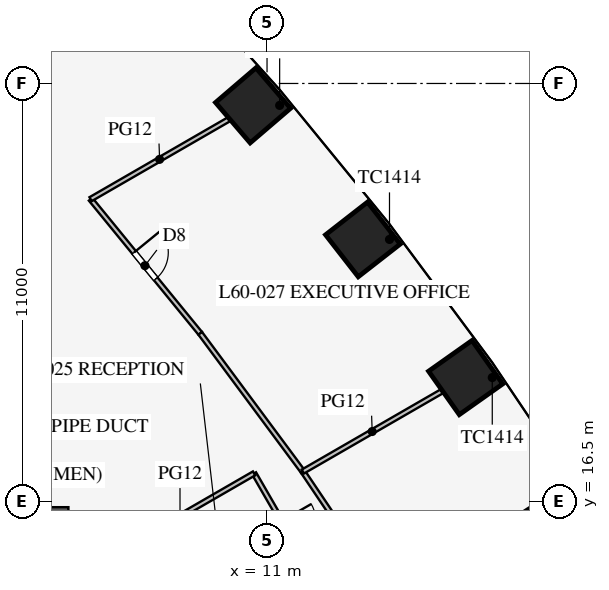
"""IFC4 building model, lengths in metres.
Left out: names, types, materials, properties, quantities, classifications, styles, units other than length and angle.
Written with IfcOpenShell. Run it as: python <this file> out.ifc"""

import sys

from ifc_helpers import new_model, si_unit, direction, frame, frame_2d, origin, origin_2d, place, context, subcontext, project, spatial, rectangle, extrude, element, fill, save


model = new_model("IFC4")
c1 = context("Model", 3, precision=1e-05, world=origin(), true_north=direction((0.0, 1.0)))
c2 = subcontext(c1, "Body", "Model", "MODEL_VIEW")
j1 = project(units=[si_unit("LENGTHUNIT", "METRE"), si_unit("PLANEANGLEUNIT", "RADIAN")], contexts=[c1])
p1 = place(None, origin())
s1 = spatial("IfcSite", under=j1, at=p1, CompositionType="ELEMENT")
p2 = place(p1, origin())
s2 = spatial("IfcBuilding", under=s1, at=p2, CompositionType="ELEMENT")
p3 = place(p2, frame((0.0, 0.0, 261.1)))
s3 = spatial("IfcBuildingStorey", under=s2, at=p3, CompositionType="ELEMENT", Elevation=261.1)
for number, where, z_axis, x_axis in (
    (1, (18.748, 16.02, 0.0), (0.0, 0.0, 1.0), (-0.539, 0.842, 0.0)),
    (2, (16.227, 19.761, 0.0), (0.0, 0.0, 1.0), (-0.577, 0.816, 0.0)),
    (3, (13.522, 23.396, 0.0), (0.0, 0.0, 1.0), (-0.615, 0.789, 0.0)),
    (4, (10.632, 26.923, 0.0), (0.0, 0.0, 1.0), (-0.651, 0.759, 0.0)),
):
    element("IfcColumn", number, at=place(p3, frame(where, z_axis=z_axis, x_axis=x_axis)), inside=s3, PredefinedType="COLUMN", context=c2, shape_type="SweptSolid", body=[
        extrude(rectangle(XDim=1.4, YDim=1.4, at=origin_2d()), origin(), (0.0, 0.0, 1.0), 4.2),
    ])
p4 = place(p3, frame((5.773, 16.0, 0.0), z_axis=(0.0, 0.0, 1.0), x_axis=(-1.0, 0.0, 0.0)))
e5 = element("IfcWall", 5, at=p4, inside=s3, PredefinedType="SHEAR", context=c2, shape_type="SweptSolid", body=[
    extrude(rectangle(XDim=11.547, YDim=0.7, at=frame_2d((5.773, 0.0))), origin(), (0.0, 0.0, 1.0), 4.2),
])
p5 = place(p3, frame((13.009, 13.168, 0.0), z_axis=(0.0, 0.0, 1.0), x_axis=(-0.500016218704, 0.866016039709, 0.0)))
e6 = element("IfcWall", 6, at=p5, inside=s3, PredefinedType="PARTITIONING", context=c2, shape_type="SweptSolid", body=[
    extrude(rectangle(XDim=4.7, YDim=0.12, at=frame_2d((2.35, 0.0))), origin(), (0.0, 0.0, 1.0), 2.9),
])
p6 = place(p5, frame((1.45, 0.0, 0.15)))
e7 = element("IfcOpeningElement", 7, at=p6, cuts=e6, PredefinedType="OPENING", context=c2, shape_type="SweptSolid", body=[
    extrude(rectangle(XDim=1.8, YDim=2.1, at=frame_2d((0.9, 1.05))), frame((0.0, 0.07, 0.0), z_axis=(0.0, -1.0, 0.0), x_axis=(1.0, 0.0, 0.0)), (0.0, 0.0, 1.0), 0.14),
])
p7 = place(p3, frame((6.761, 14.989, 0.0), z_axis=(0.0, 0.0, 1.0), x_axis=(0.866017533419, 0.500013631625, 0.0)))
e8 = element("IfcWall", 8, at=p7, inside=s3, PredefinedType="PARTITIONING", context=c2, shape_type="SweptSolid", body=[
    extrude(rectangle(XDim=4.5, YDim=0.12, at=frame_2d((2.25, 0.0))), origin(), (0.0, 0.0, 1.0), 2.9),
])
p8 = place(p3, frame((9.242, 20.924, 0.0), z_axis=(0.0, 0.0, 1.0), x_axis=(-0.632765292047, 0.774343647989, 0.0)))
e9 = element("IfcWall", 9, at=p8, inside=s3, PredefinedType="PARTITIONING", context=c2, shape_type="SweptSolid", body=[
    extrude(rectangle(XDim=4.559, YDim=0.12, at=frame_2d((2.28, 0.0))), origin(), (0.0, 0.0, 1.0), 2.9),
])
p9 = place(p8, frame((1.85, 0.0, 0.15)))
e10 = element("IfcOpeningElement", 10, at=p9, cuts=e9, PredefinedType="OPENING", context=c2, shape_type="SweptSolid", body=[
    extrude(rectangle(XDim=0.9, YDim=2.1, at=frame_2d((0.45, 1.05))), frame((0.0, 0.07, 0.0), z_axis=(0.0, -1.0, 0.0), x_axis=(1.0, 0.0, 0.0)), (0.0, 0.0, 1.0), 0.14),
])
p10 = place(p3, frame((14.462, 13.546, 0.0), z_axis=(0.0, 0.0, 1.0), x_axis=(-0.55850386778, 0.829501916619, 0.0)))
e11 = element("IfcWall", 11, at=p10, inside=s3, PredefinedType="PARTITIONING", context=c2, shape_type="SweptSolid", body=[
    extrude(rectangle(XDim=4.511, YDim=0.12, at=frame_2d((2.255, 0.0))), origin(), (0.0, 0.0, 1.0), 2.9),
])
p11 = place(p10, frame((1.8, 0.0, 0.15)))
e12 = element("IfcOpeningElement", 12, at=p11, cuts=e11, PredefinedType="OPENING", context=c2, shape_type="SweptSolid", body=[
    extrude(rectangle(XDim=0.9, YDim=2.1, at=frame_2d((0.45, 1.05))), frame((0.0, 0.07, 0.0), z_axis=(0.0, -1.0, 0.0), x_axis=(1.0, 0.0, 0.0)), (0.0, 0.0, 1.0), 0.14),
])
p12 = place(p3, frame((11.943, 17.287, 0.0), z_axis=(0.0, 0.0, 1.0), x_axis=(-0.59613842716, 0.802881669777, 0.0)))
e13 = element("IfcWall", 13, at=p12, inside=s3, PredefinedType="PARTITIONING", context=c2, shape_type="SweptSolid", body=[
    extrude(rectangle(XDim=4.53, YDim=0.12, at=frame_2d((2.265, 0.0))), origin(), (0.0, 0.0, 1.0), 2.9),
])
p13 = place(p3, frame((6.357, 24.455, 0.0), z_axis=(0.0, 0.0, 1.0), x_axis=(0.866016898545, 0.500014731218, 0.0)))
e14 = element("IfcWall", 14, at=p13, inside=s3, PredefinedType="PARTITIONING", context=c2, shape_type="SweptSolid", body=[
    extrude(rectangle(XDim=4.194, YDim=0.12, at=frame_2d((2.097, 0.0))), origin(), (0.0, 0.0, 1.0), 2.15),
])
p14 = place(p3, frame((11.943, 17.287, 0.0), z_axis=(0.0, 0.0, 1.0), x_axis=(0.866016734951, 0.50001501456, 0.0)))
e15 = element("IfcWall", 15, at=p14, inside=s3, PredefinedType="PARTITIONING", context=c2, shape_type="SweptSolid", body=[
    extrude(rectangle(XDim=4.214, YDim=0.12, at=frame_2d((2.107, 0.0))), origin(), (0.0, 0.0, 1.0), 2.35),
])
p15 = place(p9, frame((0.9, 0.0, 0.0), z_axis=(0.0, 0.0, 1.0), x_axis=(-1.0, 0.0, 0.0)))
e16 = element("IfcDoor", 16, at=p15, inside=s3, OperationType="SINGLE_SWING_LEFT", PredefinedType="DOOR", context=c2, shape_type="SweptSolid", body=[
    extrude(rectangle(XDim=0.9, YDim=2.1, at=frame_2d((0.45, 1.05))), frame((0.0, 0.025, 0.0), z_axis=(0.0, -1.0, 0.0), x_axis=(1.0, 0.0, 0.0)), (0.0, 0.0, 1.0), 0.05),
])
fill(e10, e16)
save(model, sys.argv[1])
